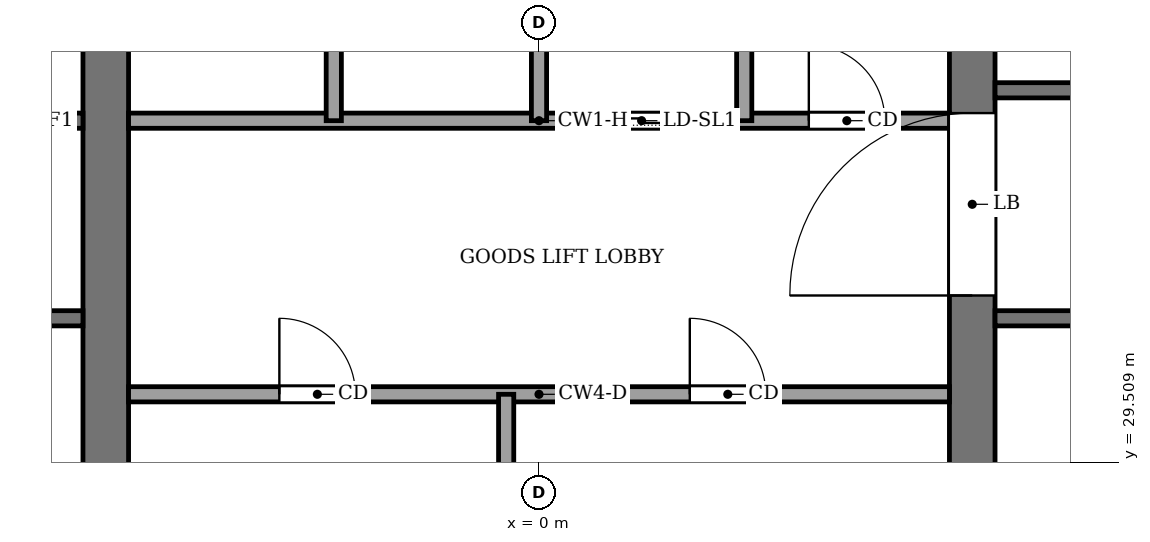
"""IFC4 building model, lengths in metres.
Left out: names, types, materials, properties, quantities, classifications, styles, units other than length and angle.
Written with IfcOpenShell. Run it as: python <this file> out.ifc"""

import sys

from ifc_helpers import new_model, si_unit, direction, frame, frame_2d, origin, place, context, subcontext, project, spatial, rectangle, extrude, element, fill, save


model = new_model("IFC4")
c1 = context("Model", 3, precision=1e-05, world=origin(), true_north=direction((0.0, 1.0)))
c2 = subcontext(c1, "Body", "Model", "MODEL_VIEW")
j1 = project(units=[si_unit("LENGTHUNIT", "METRE"), si_unit("PLANEANGLEUNIT", "RADIAN")], contexts=[c1])
p1 = place(None, origin())
s1 = spatial("IfcSite", under=j1, at=p1, CompositionType="ELEMENT")
p2 = place(p1, origin())
s2 = spatial("IfcBuilding", under=s1, at=p2, CompositionType="ELEMENT")
p3 = place(p2, frame((0.0, 0.0, 278.0)))
s3 = spatial("IfcBuildingStorey", under=s2, at=p3, CompositionType="ELEMENT", Elevation=278.0)
p4 = place(p3, frame((-5.7, 18.4, -0.13), z_axis=(0.0, 0.0, 1.0), x_axis=(0.0, 1.0, 0.0)))
e1 = element("IfcWall", 1, at=p4, inside=s3, PredefinedType="SHEAR", context=c2, shape_type="SweptSolid", body=[
    extrude(rectangle(XDim=19.2, YDim=0.6, at=frame_2d((9.6, 0.0))), origin(), (0.0, 0.0, 1.0), 3.88),
])
p5 = place(p4, frame((8.35, 0.0, 0.13)))
e2 = element("IfcOpeningElement", 2, at=p5, cuts=e1, PredefinedType="OPENING", context=c2, shape_type="SweptSolid", body=[
    extrude(rectangle(XDim=0.9, YDim=2.1, at=frame_2d((0.45, 1.05))), frame((0.0, 0.31, 0.0), z_axis=(0.0, -1.0, 0.0), x_axis=(1.0, 0.0, 0.0)), (0.0, 0.0, 1.0), 0.62),
])
p6 = place(p3, frame((5.7, 18.4, -0.13), z_axis=(0.0, 0.0, 1.0), x_axis=(0.0, 1.0, 0.0)))
e3 = element("IfcWall", 3, at=p6, inside=s3, PredefinedType="SHEAR", context=c2, shape_type="SweptSolid", body=[
    extrude(rectangle(XDim=19.2, YDim=0.6, at=frame_2d((9.6, 0.0))), origin(), (0.0, 0.0, 1.0), 3.88),
])
p7 = place(p6, frame((8.35, 0.0, 0.13)))
e4 = element("IfcOpeningElement", 4, at=p7, cuts=e3, PredefinedType="OPENING", context=c2, shape_type="SweptSolid", body=[
    extrude(rectangle(XDim=0.9, YDim=2.1, at=frame_2d((0.45, 1.05))), frame((0.0, 0.31, 0.0), z_axis=(0.0, -1.0, 0.0), x_axis=(1.0, 0.0, 0.0)), (0.0, 0.0, 1.0), 0.62),
])
p8 = place(p6, frame((13.3, 0.0, 0.13)))
e5 = element("IfcOpeningElement", 5, at=p8, cuts=e3, PredefinedType="OPENING", context=c2, shape_type="SweptSolid", body=[
    extrude(rectangle(XDim=2.4, YDim=2.4, at=frame_2d((1.2, 1.2))), frame((0.0, 0.31, 0.0), z_axis=(0.0, -1.0, 0.0), x_axis=(1.0, 0.0, 0.0)), (0.0, 0.0, 1.0), 0.62),
])
p9 = place(p3, frame((-5.4, 30.4, 0.0), z_axis=(0.0, 0.0, 1.0), x_axis=(1.0, 0.0, 0.0)))
e6 = element("IfcWall", 6, at=p9, inside=s3, PredefinedType="PARTITIONING", context=c2, shape_type="SweptSolid", body=[
    extrude(rectangle(XDim=10.8, YDim=0.2, at=frame_2d((5.4, 0.0))), origin(), (0.0, 0.0, 1.0), 3.75),
])
p10 = place(p9, frame((1.984, 0.0, 0.0)))
e7 = element("IfcOpeningElement", 7, at=p10, cuts=e6, PredefinedType="OPENING", context=c2, shape_type="SweptSolid", body=[
    extrude(rectangle(XDim=1.0, YDim=2.1, at=frame_2d((0.5, 1.05))), frame((0.0, 0.11, 0.0), z_axis=(0.0, -1.0, 0.0), x_axis=(1.0, 0.0, 0.0)), (0.0, 0.0, 1.0), 0.22),
])
p11 = place(p9, frame((7.384, 0.0, 0.0)))
e8 = element("IfcOpeningElement", 8, at=p11, cuts=e6, PredefinedType="OPENING", context=c2, shape_type="SweptSolid", body=[
    extrude(rectangle(XDim=1.0, YDim=2.1, at=frame_2d((0.5, 1.05))), frame((0.0, 0.11, 0.0), z_axis=(0.0, -1.0, 0.0), x_axis=(1.0, 0.0, 0.0)), (0.0, 0.0, 1.0), 0.22),
])
p12 = place(p3, frame((-12.6, 31.4, 0.0), z_axis=(0.0, 0.0, 1.0), x_axis=(1.0, 0.0, 0.0)))
e9 = element("IfcWall", 9, at=p12, inside=s3, PredefinedType="PARTITIONING", context=c2, shape_type="SweptSolid", body=[
    extrude(rectangle(XDim=6.6, YDim=0.2, at=frame_2d((3.3, 0.0))), origin(), (0.0, 0.0, 1.0), 3.75),
])
p13 = place(p12, frame((1.0, 0.0, 0.0)))
e10 = element("IfcOpeningElement", 10, at=p13, cuts=e9, PredefinedType="OPENING", context=c2, shape_type="SweptSolid", body=[
    extrude(rectangle(XDim=1.2, YDim=2.2, at=frame_2d((0.6, 1.1))), frame((0.0, 0.11, 0.0), z_axis=(0.0, -1.0, 0.0), x_axis=(1.0, 0.0, 0.0)), (0.0, 0.0, 1.0), 0.22),
])
p14 = place(p3, frame((6.0, 31.4, 0.0), z_axis=(0.0, 0.0, 1.0), x_axis=(1.0, 0.0, 0.0)))
e11 = element("IfcWall", 11, at=p14, inside=s3, PredefinedType="PARTITIONING", context=c2, shape_type="SweptSolid", body=[
    extrude(rectangle(XDim=6.6, YDim=0.2, at=frame_2d((3.3, 0.0))), origin(), (0.0, 0.0, 1.0), 3.75),
])
p15 = place(p3, frame((-12.6, 34.0, 0.0), z_axis=(0.0, 0.0, 1.0), x_axis=(1.0, 0.0, 0.0)))
e12 = element("IfcWall", 12, at=p15, inside=s3, PredefinedType="PARTITIONING", context=c2, shape_type="SweptSolid", body=[
    extrude(rectangle(XDim=6.6, YDim=0.2, at=frame_2d((3.3, 0.0))), origin(), (0.0, 0.0, 1.0), 3.75),
])
p16 = place(p15, frame((4.7, 0.0, 0.0)))
e13 = element("IfcOpeningElement", 13, at=p16, cuts=e12, PredefinedType="OPENING", context=c2, shape_type="SweptSolid", body=[
    extrude(rectangle(XDim=1.4, YDim=2.2, at=frame_2d((0.7, 1.1))), frame((0.0, 0.11, 0.0), z_axis=(0.0, -1.0, 0.0), x_axis=(1.0, 0.0, 0.0)), (0.0, 0.0, 1.0), 0.22),
])
p17 = place(p15, frame((2.3, 0.0, 0.0)))
e14 = element("IfcOpeningElement", 14, at=p17, cuts=e12, PredefinedType="OPENING", context=c2, shape_type="SweptSolid", body=[
    extrude(rectangle(XDim=1.4, YDim=2.2, at=frame_2d((0.7, 1.1))), frame((0.0, 0.11, 0.0), z_axis=(0.0, -1.0, 0.0), x_axis=(1.0, 0.0, 0.0)), (0.0, 0.0, 1.0), 0.22),
])
p18 = place(p15, frame((0.45, 0.0, 0.0)))
e15 = element("IfcOpeningElement", 15, at=p18, cuts=e12, PredefinedType="OPENING", context=c2, shape_type="SweptSolid", body=[
    extrude(rectangle(XDim=0.9, YDim=2.1, at=frame_2d((0.45, 1.05))), frame((0.0, 0.11, 0.0), z_axis=(0.0, -1.0, 0.0), x_axis=(1.0, 0.0, 0.0)), (0.0, 0.0, 1.0), 0.22),
])
p19 = place(p3, frame((-5.4, 34.0, 0.0), z_axis=(0.0, 0.0, 1.0), x_axis=(1.0, 0.0, 0.0)))
e16 = element("IfcWall", 16, at=p19, inside=s3, PredefinedType="PARTITIONING", context=c2, shape_type="SweptSolid", body=[
    extrude(rectangle(XDim=10.8, YDim=0.2, at=frame_2d((5.4, 0.0))), origin(), (0.0, 0.0, 1.0), 3.75),
])
p20 = place(p19, frame((6.15, 0.0, 0.0)))
e17 = element("IfcOpeningElement", 17, at=p20, cuts=e16, PredefinedType="OPENING", context=c2, shape_type="SweptSolid", body=[
    extrude(rectangle(XDim=1.2, YDim=2.2, at=frame_2d((0.6, 1.1))), frame((0.0, 0.11, 0.0), z_axis=(0.0, -1.0, 0.0), x_axis=(1.0, 0.0, 0.0)), (0.0, 0.0, 1.0), 0.22),
])
p21 = place(p19, frame((8.95, 0.0, 0.0)))
e18 = element("IfcOpeningElement", 18, at=p21, cuts=e16, PredefinedType="OPENING", context=c2, shape_type="SweptSolid", body=[
    extrude(rectangle(XDim=1.0, YDim=2.1, at=frame_2d((0.5, 1.05))), frame((0.0, 0.11, 0.0), z_axis=(0.0, -1.0, 0.0), x_axis=(1.0, 0.0, 0.0)), (0.0, 0.0, 1.0), 0.22),
])
p22 = place(p3, frame((6.0, 34.4, 0.0), z_axis=(0.0, 0.0, 1.0), x_axis=(1.0, 0.0, 0.0)))
e19 = element("IfcWall", 19, at=p22, inside=s3, PredefinedType="PARTITIONING", context=c2, shape_type="SweptSolid", body=[
    extrude(rectangle(XDim=6.6, YDim=0.2, at=frame_2d((3.3, 0.0))), origin(), (0.0, 0.0, 1.0), 3.75),
])
p23 = place(p22, frame((4.8, 0.0, 0.0)))
e20 = element("IfcOpeningElement", 20, at=p23, cuts=e19, PredefinedType="OPENING", context=c2, shape_type="SweptSolid", body=[
    extrude(rectangle(XDim=1.2, YDim=2.2, at=frame_2d((0.6, 1.1))), frame((0.0, 0.11, 0.0), z_axis=(0.0, -1.0, 0.0), x_axis=(1.0, 0.0, 0.0)), (0.0, 0.0, 1.0), 0.22),
])
p24 = place(p3, frame((-2.7, 34.0, 0.0), z_axis=(0.0, 0.0, 1.0), x_axis=(0.0, 1.0, 0.0)))
e21 = element("IfcWall", 21, at=p24, inside=s3, PredefinedType="PARTITIONING", context=c2, shape_type="SweptSolid", body=[
    extrude(rectangle(XDim=3.6, YDim=0.2, at=frame_2d((1.8, 0.0))), origin(), (0.0, 0.0, 1.0), 3.75),
])
p25 = place(p3, frame((-0.432, 28.0, 0.0), z_axis=(0.0, 0.0, 1.0), x_axis=(0.0, 1.0, 0.0)))
e22 = element("IfcWall", 22, at=p25, inside=s3, PredefinedType="PARTITIONING", context=c2, shape_type="SweptSolid", body=[
    extrude(rectangle(XDim=2.4, YDim=0.2, at=frame_2d((1.2, 0.0))), origin(), (0.0, 0.0, 1.0), 3.75),
])
for number, where, z_axis, x_axis in (
    (23, (0.0, 34.0, 0.0), (0.0, 0.0, 1.0), (0.0, 1.0, 0.0)),
    (24, (2.7, 34.0, 0.0), (0.0, 0.0, 1.0), (0.0, 1.0, 0.0)),
):
    element("IfcWall", number, at=place(p3, frame(where, z_axis=z_axis, x_axis=x_axis)), inside=s3, PredefinedType="PARTITIONING", context=c2, shape_type="SweptSolid", body=[
        extrude(rectangle(XDim=3.6, YDim=0.2, at=frame_2d((1.8, 0.0))), origin(), (0.0, 0.0, 1.0), 3.75),
    ])
p26 = place(p20, origin())
e25 = element("IfcDoor", 25, at=p26, inside=s3, OperationType="SLIDING_TO_LEFT", PredefinedType="DOOR", context=c2, shape_type="SweptSolid", body=[
    extrude(rectangle(XDim=1.2, YDim=2.2, at=frame_2d((0.6, 1.1))), frame((0.0, 0.025, 0.0), z_axis=(0.0, -1.0, 0.0), x_axis=(1.0, 0.0, 0.0)), (0.0, 0.0, 1.0), 0.05),
])
fill(e17, e25)
p27 = place(p10, origin())
e26 = element("IfcDoor", 26, at=p27, inside=s3, OperationType="SINGLE_SWING_LEFT", PredefinedType="DOOR", context=c2, shape_type="SweptSolid", body=[
    extrude(rectangle(XDim=1.0, YDim=2.1, at=frame_2d((0.5, 1.05))), frame((0.0, 0.025, 0.0), z_axis=(0.0, -1.0, 0.0), x_axis=(1.0, 0.0, 0.0)), (0.0, 0.0, 1.0), 0.05),
])
fill(e7, e26)
p28 = place(p11, origin())
e27 = element("IfcDoor", 27, at=p28, inside=s3, OperationType="SINGLE_SWING_RIGHT", PredefinedType="DOOR", context=c2, shape_type="SweptSolid", body=[
    extrude(rectangle(XDim=1.0, YDim=2.1, at=frame_2d((0.5, 1.05))), frame((0.0, 0.025, 0.0), z_axis=(0.0, -1.0, 0.0), x_axis=(1.0, 0.0, 0.0)), (0.0, 0.0, 1.0), 0.05),
])
fill(e8, e27)
p29 = place(p21, origin())
e28 = element("IfcDoor", 28, at=p29, inside=s3, OperationType="SINGLE_SWING_LEFT", PredefinedType="DOOR", context=c2, shape_type="SweptSolid", body=[
    extrude(rectangle(XDim=1.0, YDim=2.1, at=frame_2d((0.5, 1.05))), frame((0.0, 0.025, 0.0), z_axis=(0.0, -1.0, 0.0), x_axis=(1.0, 0.0, 0.0)), (0.0, 0.0, 1.0), 0.05),
])
fill(e18, e28)
p30 = place(p8, origin())
e29 = element("IfcDoor", 29, at=p30, inside=s3, OperationType="DOUBLE_DOOR_SINGLE_SWING", PredefinedType="DOOR", context=c2, shape_type="SweptSolid", body=[
    extrude(rectangle(XDim=2.4, YDim=2.4, at=frame_2d((1.2, 1.2))), frame((0.0, 0.025, 0.0), z_axis=(0.0, -1.0, 0.0), x_axis=(1.0, 0.0, 0.0)), (0.0, 0.0, 1.0), 0.05),
])
fill(e5, e29)
save(model, sys.argv[1])
